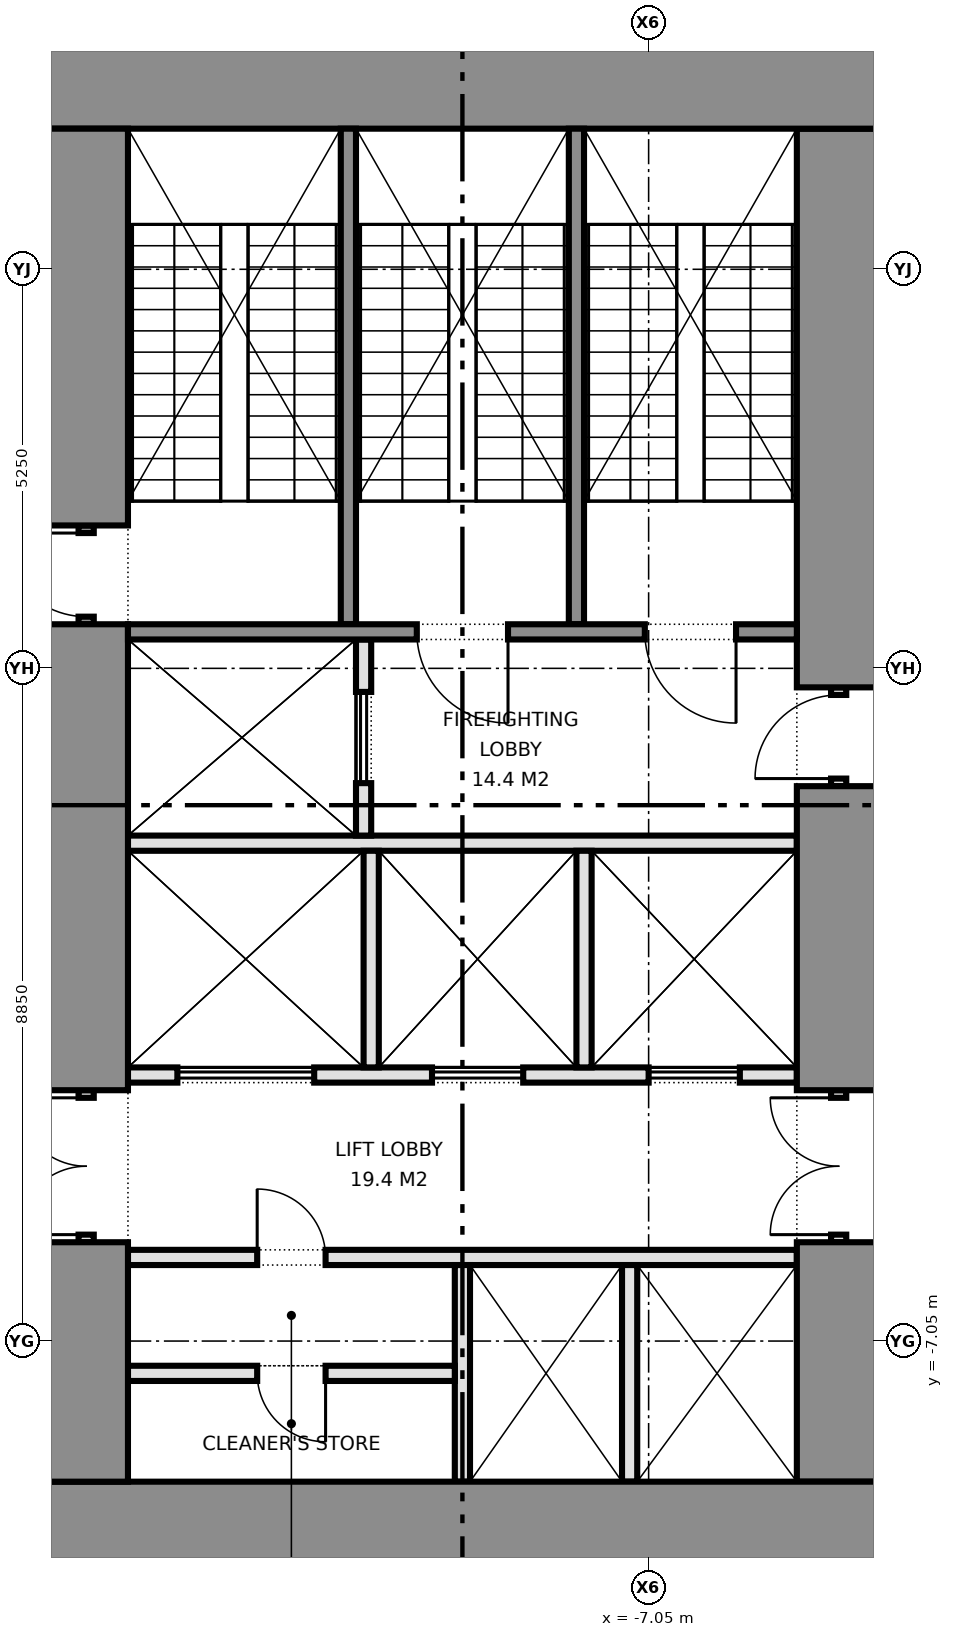
"""IFC4 building model, lengths in metres.
Left out: names, types, materials, properties, quantities, classifications, styles, units other than length and angle.
Written with IfcOpenShell. Run it as: python <this file> out.ifc"""

import sys

from ifc_helpers import new_model, si_unit, direction, frame, frame_2d, origin, place, context, subcontext, project, spatial, rectangle, extrude, element, fill, save


model = new_model("IFC4")
c1 = context("Model", 3, precision=1e-05, world=origin(), true_north=direction((0.0, 1.0)))
c2 = subcontext(c1, "Body", "Model", "MODEL_VIEW")
j1 = project(units=[si_unit("LENGTHUNIT", "METRE"), si_unit("PLANEANGLEUNIT", "RADIAN")], contexts=[c1])
p1 = place(None, origin())
s1 = spatial("IfcSite", under=j1, at=p1, CompositionType="ELEMENT")
p2 = place(p1, origin())
s2 = spatial("IfcBuilding", under=s1, at=p2, CompositionType="ELEMENT")
p3 = place(p2, frame((0.0, 0.0, 40.1)))
s3 = spatial("IfcBuildingStorey", under=s2, at=p3, CompositionType="ELEMENT", Elevation=40.1)
for number, where, z_axis, x_axis in (
    (1, (-15.0, -9.45, 0.0), (0.0, 0.0, 1.0), (1.0, 0.0, 0.0)),
    (2, (-15.0, 9.45, 0.0), (0.0, 0.0, 1.0), (1.0, 0.0, 0.0)),
):
    element("IfcWall", number, at=place(p3, frame(where, z_axis=z_axis, x_axis=x_axis)), inside=s3, PredefinedType="SHEAR", context=c2, shape_type="SweptSolid", body=[
        extrude(rectangle(XDim=11.0, YDim=1.1, at=frame_2d((5.5, 0.0))), origin(), (0.0, 0.0, 1.0), 4.575),
    ])
p4 = place(p3, frame((-14.45, -8.9, 0.0), z_axis=(0.0, 0.0, 1.0), x_axis=(0.0, 1.0, 0.0)))
e3 = element("IfcWall", 3, at=p4, inside=s3, PredefinedType="SHEAR", context=c2, shape_type="SweptSolid", body=[
    extrude(rectangle(XDim=3.15, YDim=1.1, at=frame_2d((1.575, 0.0))), origin(), (0.0, 0.0, 1.0), 4.575),
])
p5 = place(p3, frame((-14.45, -5.75, 0.0), z_axis=(0.0, 0.0, 1.0), x_axis=(0.0, 1.0, 0.0)))
e4 = element("IfcWall", 4, at=p5, inside=s3, PredefinedType="PARTITIONING", context=c2, shape_type="SweptSolid", body=[
    extrude(rectangle(XDim=2.0, YDim=0.2, at=frame_2d((1.0, 0.0))), origin(), (0.0, 0.0, 1.0), 2.4),
])
p6 = place(p5, frame((0.1, 0.0, 0.0)))
e5 = element("IfcOpeningElement", 5, at=p6, cuts=e4, PredefinedType="OPENING", context=c2, shape_type="SweptSolid", body=[
    extrude(rectangle(XDim=1.8, YDim=2.1, at=frame_2d((0.9, 1.05))), frame((0.0, 0.11, 0.0), z_axis=(0.0, -1.0, 0.0), x_axis=(1.0, 0.0, 0.0)), (0.0, 0.0, 1.0), 0.22),
])
p7 = place(p3, frame((-14.45, -3.75, 0.0), z_axis=(0.0, 0.0, 1.0), x_axis=(0.0, 1.0, 0.0)))
e6 = element("IfcWall", 6, at=p7, inside=s3, PredefinedType="SHEAR", context=c2, shape_type="SweptSolid", body=[
    extrude(rectangle(XDim=6.13, YDim=1.1, at=frame_2d((3.065, 0.0))), origin(), (0.0, 0.0, 1.0), 4.575),
])
p8 = place(p3, frame((-14.45, 2.38, 0.0), z_axis=(0.0, 0.0, 1.0), x_axis=(0.0, 1.0, 0.0)))
e7 = element("IfcWall", 7, at=p8, inside=s3, PredefinedType="SHEAR", context=c2, shape_type="SweptSolid", body=[
    extrude(rectangle(XDim=1.3, YDim=0.2, at=frame_2d((0.65, 0.0))), origin(), (0.0, 0.0, 1.0), 2.4),
])
p9 = place(p8, frame((0.1, 0.0, 0.0)))
e8 = element("IfcOpeningElement", 8, at=p9, cuts=e7, PredefinedType="OPENING", context=c2, shape_type="SweptSolid", body=[
    extrude(rectangle(XDim=1.1, YDim=2.1, at=frame_2d((0.55, 1.05))), frame((0.0, 0.11, 0.0), z_axis=(0.0, -1.0, 0.0), x_axis=(1.0, 0.0, 0.0)), (0.0, 0.0, 1.0), 0.22),
])
p10 = place(p3, frame((-14.45, 3.68, 0.0), z_axis=(0.0, 0.0, 1.0), x_axis=(0.0, 1.0, 0.0)))
e9 = element("IfcWall", 9, at=p10, inside=s3, PredefinedType="SHEAR", context=c2, shape_type="SweptSolid", body=[
    extrude(rectangle(XDim=5.22, YDim=1.1, at=frame_2d((2.61, 0.0))), origin(), (0.0, 0.0, 1.0), 4.575),
])
p11 = place(p3, frame((-4.55, -8.9, 0.0), z_axis=(0.0, 0.0, 1.0), x_axis=(0.0, 1.0, 0.0)))
e10 = element("IfcWall", 10, at=p11, inside=s3, PredefinedType="SHEAR", context=c2, shape_type="SweptSolid", body=[
    extrude(rectangle(XDim=3.15, YDim=1.1, at=frame_2d((1.575, 0.0))), origin(), (0.0, 0.0, 1.0), 4.575),
])
p12 = place(p3, frame((-4.55, -5.75, 0.0), z_axis=(0.0, 0.0, 1.0), x_axis=(0.0, 1.0, 0.0)))
e11 = element("IfcWall", 11, at=p12, inside=s3, PredefinedType="PARTITIONING", context=c2, shape_type="SweptSolid", body=[
    extrude(rectangle(XDim=2.0, YDim=0.2, at=frame_2d((1.0, 0.0))), origin(), (0.0, 0.0, 1.0), 2.4),
])
p13 = place(p12, frame((0.1, 0.0, 0.0)))
e12 = element("IfcOpeningElement", 12, at=p13, cuts=e11, PredefinedType="OPENING", context=c2, shape_type="SweptSolid", body=[
    extrude(rectangle(XDim=1.8, YDim=2.1, at=frame_2d((0.9, 1.05))), frame((0.0, 0.11, 0.0), z_axis=(0.0, -1.0, 0.0), x_axis=(1.0, 0.0, 0.0)), (0.0, 0.0, 1.0), 0.22),
])
p14 = place(p3, frame((-4.55, -3.75, 0.0), z_axis=(0.0, 0.0, 1.0), x_axis=(0.0, 1.0, 0.0)))
e13 = element("IfcWall", 13, at=p14, inside=s3, PredefinedType="SHEAR", context=c2, shape_type="SweptSolid", body=[
    extrude(rectangle(XDim=4.0, YDim=1.1, at=frame_2d((2.0, 0.0))), origin(), (0.0, 0.0, 1.0), 4.575),
])
p15 = place(p3, frame((-4.55, 0.25, 0.0), z_axis=(0.0, 0.0, 1.0), x_axis=(0.0, 1.0, 0.0)))
e14 = element("IfcWall", 14, at=p15, inside=s3, PredefinedType="PARTITIONING", context=c2, shape_type="SweptSolid", body=[
    extrude(rectangle(XDim=1.3, YDim=0.2, at=frame_2d((0.65, 0.0))), origin(), (0.0, 0.0, 1.0), 2.4),
])
p16 = place(p15, frame((0.1, 0.0, 0.0)))
e15 = element("IfcOpeningElement", 15, at=p16, cuts=e14, PredefinedType="OPENING", context=c2, shape_type="SweptSolid", body=[
    extrude(rectangle(XDim=1.1, YDim=2.1, at=frame_2d((0.55, 1.05))), frame((0.0, 0.11, 0.0), z_axis=(0.0, -1.0, 0.0), x_axis=(1.0, 0.0, 0.0)), (0.0, 0.0, 1.0), 0.22),
])
p17 = place(p3, frame((-4.55, 1.55, 0.0), z_axis=(0.0, 0.0, 1.0), x_axis=(0.0, 1.0, 0.0)))
e16 = element("IfcWall", 16, at=p17, inside=s3, PredefinedType="SHEAR", context=c2, shape_type="SweptSolid", body=[
    extrude(rectangle(XDim=7.35, YDim=1.1, at=frame_2d((3.675, 0.0))), origin(), (0.0, 0.0, 1.0), 4.575),
])
p18 = place(p3, frame((-13.9, -5.95, 0.0), z_axis=(0.0, 0.0, 1.0), x_axis=(1.0, 0.0, 0.0)))
e17 = element("IfcWall", 17, at=p18, inside=s3, PredefinedType="PARTITIONING", context=c2, shape_type="SweptSolid", body=[
    extrude(rectangle(XDim=8.8, YDim=0.2, at=frame_2d((4.4, 0.0))), origin(), (0.0, 0.0, 1.0), 4.575),
])
p19 = place(p18, frame((1.7, 0.0, 0.0)))
e18 = element("IfcOpeningElement", 18, at=p19, cuts=e17, PredefinedType="OPENING", context=c2, shape_type="SweptSolid", body=[
    extrude(rectangle(XDim=0.9, YDim=2.1, at=frame_2d((0.45, 1.05))), frame((0.0, 0.11, 0.0), z_axis=(0.0, -1.0, 0.0), x_axis=(1.0, 0.0, 0.0)), (0.0, 0.0, 1.0), 0.22),
])
p20 = place(p3, frame((-13.9, -3.55, 0.0), z_axis=(0.0, 0.0, 1.0), x_axis=(1.0, 0.0, 0.0)))
e19 = element("IfcWall", 19, at=p20, inside=s3, PredefinedType="PARTITIONING", context=c2, shape_type="SweptSolid", body=[
    extrude(rectangle(XDim=8.8, YDim=0.2, at=frame_2d((4.4, 0.0))), origin(), (0.0, 0.0, 1.0), 4.575),
])
p21 = place(p20, frame((0.65, 0.0, 0.0)))
e20 = element("IfcOpeningElement", 20, at=p21, cuts=e19, PredefinedType="OPENING", context=c2, shape_type="SweptSolid", body=[
    extrude(rectangle(XDim=1.8, YDim=2.1, at=frame_2d((0.9, 1.05))), frame((0.0, 0.11, 0.0), z_axis=(0.0, -1.0, 0.0), x_axis=(1.0, 0.0, 0.0)), (0.0, 0.0, 1.0), 0.22),
])
p22 = place(p20, frame((4.0, 0.0, 0.0)))
e21 = element("IfcOpeningElement", 21, at=p22, cuts=e19, PredefinedType="OPENING", context=c2, shape_type="SweptSolid", body=[
    extrude(rectangle(XDim=1.2, YDim=2.1, at=frame_2d((0.6, 1.05))), frame((0.0, 0.11, 0.0), z_axis=(0.0, -1.0, 0.0), x_axis=(1.0, 0.0, 0.0)), (0.0, 0.0, 1.0), 0.22),
])
p23 = place(p20, frame((6.85, 0.0, 0.0)))
e22 = element("IfcOpeningElement", 22, at=p23, cuts=e19, PredefinedType="OPENING", context=c2, shape_type="SweptSolid", body=[
    extrude(rectangle(XDim=1.2, YDim=2.1, at=frame_2d((0.6, 1.05))), frame((0.0, 0.11, 0.0), z_axis=(0.0, -1.0, 0.0), x_axis=(1.0, 0.0, 0.0)), (0.0, 0.0, 1.0), 0.22),
])
p24 = place(p3, frame((-13.9, -0.5, 0.0), z_axis=(0.0, 0.0, 1.0), x_axis=(1.0, 0.0, 0.0)))
e23 = element("IfcWall", 23, at=p24, inside=s3, PredefinedType="PARTITIONING", context=c2, shape_type="SweptSolid", body=[
    extrude(rectangle(XDim=8.8, YDim=0.2, at=frame_2d((4.4, 0.0))), origin(), (0.0, 0.0, 1.0), 4.575),
])
p25 = place(p3, frame((-10.8, -0.4, 0.0), z_axis=(0.0, 0.0, 1.0), x_axis=(0.0, 1.0, 0.0)))
e24 = element("IfcWall", 24, at=p25, inside=s3, PredefinedType="PARTITIONING", context=c2, shape_type="SweptSolid", body=[
    extrude(rectangle(XDim=2.58, YDim=0.2, at=frame_2d((1.29, 0.0))), origin(), (0.0, 0.0, 1.0), 4.575),
])
p26 = place(p25, frame((0.69, 0.0, 0.0)))
e25 = element("IfcOpeningElement", 25, at=p26, cuts=e24, PredefinedType="OPENING", context=c2, shape_type="SweptSolid", body=[
    extrude(rectangle(XDim=1.2, YDim=2.1, at=frame_2d((0.6, 1.05))), frame((0.0, 0.11, 0.0), z_axis=(0.0, -1.0, 0.0), x_axis=(1.0, 0.0, 0.0)), (0.0, 0.0, 1.0), 0.22),
])
p27 = place(p3, frame((-13.9, 2.28, 0.0), z_axis=(0.0, 0.0, 1.0), x_axis=(1.0, 0.0, 0.0)))
e26 = element("IfcWall", 26, at=p27, inside=s3, PredefinedType="SHEAR", context=c2, shape_type="SweptSolid", body=[
    extrude(rectangle(XDim=8.8, YDim=0.2, at=frame_2d((4.4, 0.0))), origin(), (0.0, 0.0, 1.0), 4.575),
])
p28 = place(p27, frame((3.8, 0.0, 0.0)))
e27 = element("IfcOpeningElement", 27, at=p28, cuts=e26, PredefinedType="OPENING", context=c2, shape_type="SweptSolid", body=[
    extrude(rectangle(XDim=1.2, YDim=2.1, at=frame_2d((0.6, 1.05))), frame((0.0, 0.11, 0.0), z_axis=(0.0, -1.0, 0.0), x_axis=(1.0, 0.0, 0.0)), (0.0, 0.0, 1.0), 0.22),
])
p29 = place(p27, frame((6.8, 0.0, 0.0)))
e28 = element("IfcOpeningElement", 28, at=p29, cuts=e26, PredefinedType="OPENING", context=c2, shape_type="SweptSolid", body=[
    extrude(rectangle(XDim=1.2, YDim=2.1, at=frame_2d((0.6, 1.05))), frame((0.0, 0.11, 0.0), z_axis=(0.0, -1.0, 0.0), x_axis=(1.0, 0.0, 0.0)), (0.0, 0.0, 1.0), 0.22),
])
for number, where, z_axis, x_axis in (
    (29, (-11.0, 2.38, 0.0), (0.0, 0.0, 1.0), (0.0, 1.0, 0.0)),
    (30, (-8.0, 2.38, 0.0), (0.0, 0.0, 1.0), (0.0, 1.0, 0.0)),
):
    element("IfcWall", number, at=place(p3, frame(where, z_axis=z_axis, x_axis=x_axis)), inside=s3, PredefinedType="SHEAR", context=c2, shape_type="SweptSolid", body=[
        extrude(rectangle(XDim=6.52, YDim=0.2, at=frame_2d((3.26, 0.0))), origin(), (0.0, 0.0, 1.0), 4.575),
    ])
for number, where, z_axis, x_axis in (
    (31, (-9.5, -8.9, 0.0), (0.0, 0.0, 1.0), (0.0, 1.0, 0.0)),
    (32, (-7.3, -8.9, 0.0), (0.0, 0.0, 1.0), (0.0, 1.0, 0.0)),
):
    element("IfcWall", number, at=place(p3, frame(where, z_axis=z_axis, x_axis=x_axis)), inside=s3, PredefinedType="PARTITIONING", context=c2, shape_type="SweptSolid", body=[
        extrude(rectangle(XDim=2.85, YDim=0.2, at=frame_2d((1.425, 0.0))), origin(), (0.0, 0.0, 1.0), 4.575),
    ])
p30 = place(p3, frame((-13.9, -7.475, 0.0), z_axis=(0.0, 0.0, 1.0), x_axis=(1.0, 0.0, 0.0)))
e33 = element("IfcWall", 33, at=p30, inside=s3, PredefinedType="PARTITIONING", context=c2, shape_type="SweptSolid", body=[
    extrude(rectangle(XDim=4.3, YDim=0.2, at=frame_2d((2.15, 0.0))), origin(), (0.0, 0.0, 1.0), 4.575),
])
p31 = place(p30, frame((1.7, 0.0, 0.0)))
e34 = element("IfcOpeningElement", 34, at=p31, cuts=e33, PredefinedType="OPENING", context=c2, shape_type="SweptSolid", body=[
    extrude(rectangle(XDim=0.9, YDim=2.1, at=frame_2d((0.45, 1.05))), frame((0.0, 0.11, 0.0), z_axis=(0.0, -1.0, 0.0), x_axis=(1.0, 0.0, 0.0)), (0.0, 0.0, 1.0), 0.22),
])
for number, where, z_axis, x_axis in (
    (35, (-10.7, -3.45, 0.0), (0.0, 0.0, 1.0), (0.0, 1.0, 0.0)),
    (36, (-7.9, -3.45, 0.0), (0.0, 0.0, 1.0), (0.0, 1.0, 0.0)),
):
    element("IfcWall", number, at=place(p3, frame(where, z_axis=z_axis, x_axis=x_axis)), inside=s3, PredefinedType="PARTITIONING", context=c2, shape_type="SweptSolid", body=[
        extrude(rectangle(XDim=2.85, YDim=0.2, at=frame_2d((1.425, 0.0))), origin(), (0.0, 0.0, 1.0), 4.575),
    ])
p32 = place(p6, origin())
e37 = element("IfcDoor", 37, at=p32, inside=s3, OperationType="DOUBLE_DOOR_SINGLE_SWING", PredefinedType="DOOR", context=c2, shape_type="SweptSolid", body=[
    extrude(rectangle(XDim=1.8, YDim=2.1, at=frame_2d((0.9, 1.05))), frame((0.0, 0.025, 0.0), z_axis=(0.0, -1.0, 0.0), x_axis=(1.0, 0.0, 0.0)), (0.0, 0.0, 1.0), 0.05),
])
fill(e5, e37)
p33 = place(p9, origin())
e38 = element("IfcDoor", 38, at=p33, inside=s3, OperationType="SINGLE_SWING_RIGHT", PredefinedType="DOOR", context=c2, shape_type="SweptSolid", body=[
    extrude(rectangle(XDim=1.1, YDim=2.1, at=frame_2d((0.55, 1.05))), frame((0.0, 0.025, 0.0), z_axis=(0.0, -1.0, 0.0), x_axis=(1.0, 0.0, 0.0)), (0.0, 0.0, 1.0), 0.05),
])
fill(e8, e38)
p34 = place(p13, origin())
e39 = element("IfcDoor", 39, at=p34, inside=s3, OperationType="DOUBLE_DOOR_SINGLE_SWING", PredefinedType="DOOR", context=c2, shape_type="SweptSolid", body=[
    extrude(rectangle(XDim=1.8, YDim=2.1, at=frame_2d((0.9, 1.05))), frame((0.0, 0.025, 0.0), z_axis=(0.0, -1.0, 0.0), x_axis=(1.0, 0.0, 0.0)), (0.0, 0.0, 1.0), 0.05),
])
fill(e12, e39)
p35 = place(p16, origin())
e40 = element("IfcDoor", 40, at=p35, inside=s3, OperationType="SINGLE_SWING_LEFT", PredefinedType="DOOR", context=c2, shape_type="SweptSolid", body=[
    extrude(rectangle(XDim=1.1, YDim=2.1, at=frame_2d((0.55, 1.05))), frame((0.0, 0.025, 0.0), z_axis=(0.0, -1.0, 0.0), x_axis=(1.0, 0.0, 0.0)), (0.0, 0.0, 1.0), 0.05),
])
fill(e15, e40)
p36 = place(p21, origin())
e41 = element("IfcDoor", 41, at=p36, inside=s3, OperationType="DOUBLE_DOOR_SLIDING", PredefinedType="DOOR", context=c2, shape_type="SweptSolid", body=[
    extrude(rectangle(XDim=1.8, YDim=2.1, at=frame_2d((0.9, 1.05))), frame((0.0, 0.025, 0.0), z_axis=(0.0, -1.0, 0.0), x_axis=(1.0, 0.0, 0.0)), (0.0, 0.0, 1.0), 0.05),
])
fill(e20, e41)
p37 = place(p22, origin())
e42 = element("IfcDoor", 42, at=p37, inside=s3, OperationType="DOUBLE_DOOR_SLIDING", PredefinedType="DOOR", context=c2, shape_type="SweptSolid", body=[
    extrude(rectangle(XDim=1.2, YDim=2.1, at=frame_2d((0.6, 1.05))), frame((0.0, 0.025, 0.0), z_axis=(0.0, -1.0, 0.0), x_axis=(1.0, 0.0, 0.0)), (0.0, 0.0, 1.0), 0.05),
])
fill(e21, e42)
p38 = place(p23, origin())
e43 = element("IfcDoor", 43, at=p38, inside=s3, OperationType="DOUBLE_DOOR_SLIDING", PredefinedType="DOOR", context=c2, shape_type="SweptSolid", body=[
    extrude(rectangle(XDim=1.2, YDim=2.1, at=frame_2d((0.6, 1.05))), frame((0.0, 0.025, 0.0), z_axis=(0.0, -1.0, 0.0), x_axis=(1.0, 0.0, 0.0)), (0.0, 0.0, 1.0), 0.05),
])
fill(e22, e43)
p39 = place(p26, origin())
e44 = element("IfcDoor", 44, at=p39, inside=s3, OperationType="DOUBLE_DOOR_SLIDING", PredefinedType="DOOR", context=c2, shape_type="SweptSolid", body=[
    extrude(rectangle(XDim=1.2, YDim=2.1, at=frame_2d((0.6, 1.05))), frame((0.0, 0.025, 0.0), z_axis=(0.0, -1.0, 0.0), x_axis=(1.0, 0.0, 0.0)), (0.0, 0.0, 1.0), 0.05),
])
fill(e25, e44)
p40 = place(p19, origin())
e45 = element("IfcDoor", 45, at=p40, inside=s3, OperationType="SINGLE_SWING_LEFT", PredefinedType="DOOR", context=c2, shape_type="SweptSolid", body=[
    extrude(rectangle(XDim=0.9, YDim=2.1, at=frame_2d((0.45, 1.05))), frame((0.0, 0.025, 0.0), z_axis=(0.0, -1.0, 0.0), x_axis=(1.0, 0.0, 0.0)), (0.0, 0.0, 1.0), 0.05),
])
fill(e18, e45)
p41 = place(p31, frame((0.9, 0.0, 0.0), z_axis=(0.0, 0.0, 1.0), x_axis=(-1.0, 0.0, 0.0)))
e46 = element("IfcDoor", 46, at=p41, inside=s3, OperationType="SINGLE_SWING_LEFT", PredefinedType="DOOR", context=c2, shape_type="SweptSolid", body=[
    extrude(rectangle(XDim=0.9, YDim=2.1, at=frame_2d((0.45, 1.05))), frame((0.0, 0.025, 0.0), z_axis=(0.0, -1.0, 0.0), x_axis=(1.0, 0.0, 0.0)), (0.0, 0.0, 1.0), 0.05),
])
fill(e34, e46)
p42 = place(p28, frame((1.2, 0.0, 0.0), z_axis=(0.0, 0.0, 1.0), x_axis=(-1.0, 0.0, 0.0)))
e47 = element("IfcDoor", 47, at=p42, inside=s3, OperationType="SINGLE_SWING_LEFT", PredefinedType="DOOR", context=c2, shape_type="SweptSolid", body=[
    extrude(rectangle(XDim=1.2, YDim=2.1, at=frame_2d((0.6, 1.05))), frame((0.0, 0.025, 0.0), z_axis=(0.0, -1.0, 0.0), x_axis=(1.0, 0.0, 0.0)), (0.0, 0.0, 1.0), 0.05),
])
fill(e27, e47)
p43 = place(p29, frame((1.2, 0.0, 0.0), z_axis=(0.0, 0.0, 1.0), x_axis=(-1.0, 0.0, 0.0)))
e48 = element("IfcDoor", 48, at=p43, inside=s3, OperationType="SINGLE_SWING_LEFT", PredefinedType="DOOR", context=c2, shape_type="SweptSolid", body=[
    extrude(rectangle(XDim=1.2, YDim=2.1, at=frame_2d((0.6, 1.05))), frame((0.0, 0.025, 0.0), z_axis=(0.0, -1.0, 0.0), x_axis=(1.0, 0.0, 0.0)), (0.0, 0.0, 1.0), 0.05),
])
fill(e28, e48)
save(model, sys.argv[1])
